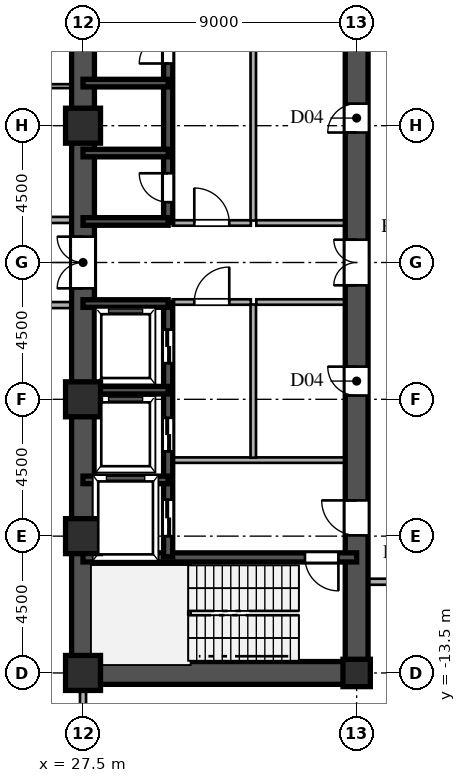
"""IFC4 building model, lengths in metres.
Left out: names, types, materials, properties, quantities, classifications, styles, units other than length and angle.
Written with IfcOpenShell. Run it as: python <this file> out.ifc"""

import sys

from ifc_helpers import new_model, si_unit, direction, frame, frame_2d, origin, origin_2d, place, context, subcontext, project, spatial, rectangle, hollow_rectangle, i_section, extrude, source, transform, mapped, element, fill, save


model = new_model("IFC4")
c1 = context("Model", 3, precision=1e-05, world=origin(), true_north=direction((0.0, 1.0)))
c2 = subcontext(c1, "Body", "Model", "MODEL_VIEW")
j1 = project(units=[si_unit("LENGTHUNIT", "METRE"), si_unit("PLANEANGLEUNIT", "RADIAN")], contexts=[c1])
p1 = place(None, origin())
s1 = spatial("IfcSite", under=j1, at=p1, CompositionType="ELEMENT")
p2 = place(p1, origin())
s2 = spatial("IfcBuilding", under=s1, at=p2, CompositionType="ELEMENT")
p3 = place(p2, frame((0.0, 0.0, -9.6)))
s3 = spatial("IfcBuildingStorey", under=s2, at=p3, CompositionType="ELEMENT", Elevation=-9.6)
m1 = source(origin(), c2, "Body", "SweptSolid", [
    extrude(hollow_rectangle(XDim=1.15, YDim=1.15, WallThickness=0.048, at=origin_2d()), origin(), (0.0, 0.0, 1.0), 4.8),
])
for number, where, z_axis, x_axis in (
    (1, (27.5, -13.5, 0.0), (0.0, 0.0, 1.0), (1.0, 0.0, 0.0)),
    (2, (27.5, -9.0, 0.0), (0.0, 0.0, 1.0), (1.0, 0.0, 0.0)),
    (3, (27.5, -4.5, 0.0), (0.0, 0.0, 1.0), (1.0, 0.0, 0.0)),
    (4, (27.5, 4.5, 0.0), (0.0, 0.0, 1.0), (1.0, 0.0, 0.0)),
):
    element("IfcColumn", number, at=place(p3, frame(where, z_axis=z_axis, x_axis=x_axis)), inside=s3, PredefinedType="COLUMN", context=c2, shape_type="MappedRepresentation", body=[
        mapped(m1, transform((0.0, 0.0, 0.0), scale=1.0)),
    ])
m2 = source(origin(), c2, "Body", "SweptSolid", [
    extrude(i_section(OverallWidth=0.9, OverallDepth=0.9, WebThickness=0.036, FlangeThickness=0.055, at=origin_2d()), origin(), (0.0, 0.0, 1.0), 4.8),
])
p4 = place(p3, frame((36.5, -13.5, 0.0), z_axis=(0.0, 0.0, 1.0), x_axis=(1.0, 0.0, 0.0)))
e5 = element("IfcColumn", 5, at=p4, inside=s3, PredefinedType="COLUMN", context=c2, shape_type="MappedRepresentation", body=[
    mapped(m2, transform((0.0, 0.0, 0.0), scale=1.0)),
])
for number, where, z_axis, x_axis in (
    (6, (27.5, -13.5, 0.0), (0.0, 0.0, 1.0), (0.0, 1.0, 0.0)),
    (7, (27.5, 1.3, 0.0), (0.0, 0.0, 1.0), (0.0, 1.0, 0.0)),
):
    element("IfcWall", number, at=place(p3, frame(where, z_axis=z_axis, x_axis=x_axis)), inside=s3, PredefinedType="SHEAR", context=c2, shape_type="SweptSolid", body=[
        extrude(rectangle(XDim=12.2, YDim=0.75, at=frame_2d((6.1, 0.0))), origin(), (0.0, 0.0, 1.0), 4.5),
    ])
p5 = place(p3, frame((27.5, -1.3, 0.0), z_axis=(0.0, 0.0, 1.0), x_axis=(0.0, 1.0, 0.0)))
e8 = element("IfcWall", 8, at=p5, inside=s3, PredefinedType="SHEAR", context=c2, shape_type="SweptSolid", body=[
    extrude(rectangle(XDim=2.6, YDim=0.75, at=frame_2d((1.3, 0.0))), origin(), (0.0, 0.0, 1.0), 4.5),
])
p6 = place(p5, frame((0.45, 0.0, 0.0)))
e9 = element("IfcOpeningElement", 9, at=p6, cuts=e8, PredefinedType="OPENING", context=c2, shape_type="SweptSolid", body=[
    extrude(rectangle(XDim=1.7, YDim=2.35, at=frame_2d((0.85, 1.175))), frame((0.0, 0.385, 0.0), z_axis=(0.0, -1.0, 0.0), x_axis=(1.0, 0.0, 0.0)), (0.0, 0.0, 1.0), 0.77),
])
p7 = place(p3, frame((27.5, -13.5, 0.0), z_axis=(0.0, 0.0, 1.0), x_axis=(1.0, 0.0, 0.0)))
e10 = element("IfcWall", 10, at=p7, inside=s3, PredefinedType="SHEAR", context=c2, shape_type="SweptSolid", body=[
    extrude(rectangle(XDim=9.0, YDim=0.75, at=frame_2d((4.5, 0.0))), origin(), (0.0, 0.0, 1.0), 4.5),
])
p8 = place(p3, frame((36.5, -13.65, 0.0), z_axis=(0.0, 0.0, 1.0), x_axis=(0.0, 1.0, 0.0)))
e11 = element("IfcWall", 11, at=p8, inside=s3, PredefinedType="SHEAR", context=c2, shape_type="SweptSolid", body=[
    extrude(rectangle(XDim=7.15, YDim=0.75, at=frame_2d((3.575, 0.0))), origin(), (0.0, 0.0, 1.0), 4.5),
])
p9 = place(p8, frame((4.675, 0.0, 0.0)))
e12 = element("IfcOpeningElement", 12, at=p9, cuts=e11, PredefinedType="OPENING", context=c2, shape_type="SweptSolid", body=[
    extrude(rectangle(XDim=1.15, YDim=2.2, at=frame_2d((0.575, 1.1))), frame((0.0, 0.385, 0.0), z_axis=(0.0, -1.0, 0.0), x_axis=(1.0, 0.0, 0.0)), (0.0, 0.0, 1.0), 0.77),
])
p10 = place(p3, frame((36.5, -1.3, 0.0), z_axis=(0.0, 0.0, 1.0), x_axis=(0.0, 1.0, 0.0)))
e13 = element("IfcWall", 13, at=p10, inside=s3, PredefinedType="SHEAR", context=c2, shape_type="SweptSolid", body=[
    extrude(rectangle(XDim=2.6, YDim=0.75, at=frame_2d((1.3, 0.0))), origin(), (0.0, 0.0, 1.0), 4.5),
])
p11 = place(p10, frame((0.55, 0.0, 0.0)))
e14 = element("IfcOpeningElement", 14, at=p11, cuts=e13, PredefinedType="OPENING", context=c2, shape_type="SweptSolid", body=[
    extrude(rectangle(XDim=1.5, YDim=2.3, at=frame_2d((0.75, 1.15))), frame((0.0, 0.385, 0.0), z_axis=(0.0, -1.0, 0.0), x_axis=(1.0, 0.0, 0.0)), (0.0, 0.0, 1.0), 0.77),
])
p12 = place(p3, frame((36.5, -6.5, 0.0), z_axis=(0.0, 0.0, 1.0), x_axis=(0.0, 1.0, 0.0)))
e15 = element("IfcWall", 15, at=p12, inside=s3, PredefinedType="SHEAR", context=c2, shape_type="SweptSolid", body=[
    extrude(rectangle(XDim=5.2, YDim=0.75, at=frame_2d((2.6, 0.0))), origin(), (0.0, 0.0, 1.0), 4.5),
])
p13 = place(p12, frame((2.125, 0.0, 0.0)))
e16 = element("IfcOpeningElement", 16, at=p13, cuts=e15, PredefinedType="OPENING", context=c2, shape_type="SweptSolid", body=[
    extrude(rectangle(XDim=0.95, YDim=2.15, at=frame_2d((0.475, 1.075))), frame((0.0, 0.385, 0.0), z_axis=(0.0, -1.0, 0.0), x_axis=(1.0, 0.0, 0.0)), (0.0, 0.0, 1.0), 0.77),
])
p14 = place(p3, frame((36.5, 1.3, 0.0), z_axis=(0.0, 0.0, 1.0), x_axis=(0.0, 1.0, 0.0)))
e17 = element("IfcWall", 17, at=p14, inside=s3, PredefinedType="SHEAR", context=c2, shape_type="SweptSolid", body=[
    extrude(rectangle(XDim=6.9, YDim=0.75, at=frame_2d((3.45, 0.0))), origin(), (0.0, 0.0, 1.0), 4.5),
])
p15 = place(p14, frame((2.975, 0.0, 0.0)))
e18 = element("IfcOpeningElement", 18, at=p15, cuts=e17, PredefinedType="OPENING", context=c2, shape_type="SweptSolid", body=[
    extrude(rectangle(XDim=0.95, YDim=2.15, at=frame_2d((0.475, 1.075))), frame((0.0, 0.385, 0.0), z_axis=(0.0, -1.0, 0.0), x_axis=(1.0, 0.0, 0.0)), (0.0, 0.0, 1.0), 0.77),
])
p16 = place(p3, frame((27.5, -9.7, 0.0), z_axis=(0.0, 0.0, 1.0), x_axis=(1.0, 0.0, 0.0)))
e19 = element("IfcWall", 19, at=p16, inside=s3, PredefinedType="SHEAR", context=c2, shape_type="SweptSolid", body=[
    extrude(rectangle(XDim=9.0, YDim=0.3, at=frame_2d((4.5, 0.0))), origin(), (0.0, 0.0, 1.0), 4.5),
])
p17 = place(p16, frame((7.3, 0.0, 0.0)))
e20 = element("IfcOpeningElement", 20, at=p17, cuts=e19, PredefinedType="OPENING", context=c2, shape_type="SweptSolid", body=[
    extrude(rectangle(XDim=1.1, YDim=2.2, at=frame_2d((0.55, 1.1))), frame((0.0, 0.16, 0.0), z_axis=(0.0, -1.0, 0.0), x_axis=(1.0, 0.0, 0.0)), (0.0, 0.0, 1.0), 0.32),
])
for number, where, z_axis, x_axis in (
    (21, (27.5, -7.15, 0.0), (0.0, 0.0, 1.0), (1.0, 0.0, 0.0)),
    (22, (27.5, -4.2, 0.0), (0.0, 0.0, 1.0), (1.0, 0.0, 0.0)),
    (23, (27.5, -1.35, 0.0), (0.0, 0.0, 1.0), (1.0, 0.0, 0.0)),
    (24, (27.5, 1.35, 0.0), (0.0, 0.0, 1.0), (1.0, 0.0, 0.0)),
    (25, (27.5, 3.6, 0.0), (0.0, 0.0, 1.0), (1.0, 0.0, 0.0)),
    (26, (27.5, 5.9, 0.0), (0.0, 0.0, 1.0), (1.0, 0.0, 0.0)),
):
    element("IfcWall", number, at=place(p3, frame(where, z_axis=z_axis, x_axis=x_axis)), inside=s3, PredefinedType="SHEAR", context=c2, shape_type="SweptSolid", body=[
        extrude(rectangle(XDim=2.8, YDim=0.25, at=frame_2d((1.4, 0.0))), origin(), (0.0, 0.0, 1.0), 4.5),
    ])
p18 = place(p3, frame((30.3, -9.68, 0.0), z_axis=(0.0, 0.0, 1.0), x_axis=(0.0, 1.0, 0.0)))
e27 = element("IfcWall", 27, at=p18, inside=s3, PredefinedType="SHEAR", context=c2, shape_type="SweptSolid", body=[
    extrude(rectangle(XDim=2.56, YDim=0.3, at=frame_2d((1.28, 0.0))), origin(), (0.0, 0.0, 1.0), 4.5),
])
p19 = place(p18, frame((0.68, 0.0, 0.0)))
e28 = element("IfcOpeningElement", 28, at=p19, cuts=e27, PredefinedType="OPENING", context=c2, shape_type="SweptSolid", body=[
    extrude(rectangle(XDim=1.2, YDim=2.25, at=frame_2d((0.6, 1.125))), frame((0.0, 0.16, 0.0), z_axis=(0.0, -1.0, 0.0), x_axis=(1.0, 0.0, 0.0)), (0.0, 0.0, 1.0), 0.32),
])
p20 = place(p3, frame((30.3, -7.12, 0.0), z_axis=(0.0, 0.0, 1.0), x_axis=(0.0, 1.0, 0.0)))
e29 = element("IfcWall", 29, at=p20, inside=s3, PredefinedType="SHEAR", context=c2, shape_type="SweptSolid", body=[
    extrude(rectangle(XDim=2.92, YDim=0.3, at=frame_2d((1.46, 0.0))), origin(), (0.0, 0.0, 1.0), 4.5),
])
p21 = place(p20, frame((0.91, 0.0, 0.0)))
e30 = element("IfcOpeningElement", 30, at=p21, cuts=e29, PredefinedType="OPENING", context=c2, shape_type="SweptSolid", body=[
    extrude(rectangle(XDim=1.1, YDim=2.2, at=frame_2d((0.55, 1.1))), frame((0.0, 0.16, 0.0), z_axis=(0.0, -1.0, 0.0), x_axis=(1.0, 0.0, 0.0)), (0.0, 0.0, 1.0), 0.32),
])
p22 = place(p3, frame((30.3, -4.2, 0.0), z_axis=(0.0, 0.0, 1.0), x_axis=(0.0, 1.0, 0.0)))
e31 = element("IfcWall", 31, at=p22, inside=s3, PredefinedType="SHEAR", context=c2, shape_type="SweptSolid", body=[
    extrude(rectangle(XDim=2.88, YDim=0.3, at=frame_2d((1.44, 0.0))), origin(), (0.0, 0.0, 1.0), 4.5),
])
p23 = place(p22, frame((0.89, 0.0, 0.0)))
e32 = element("IfcOpeningElement", 32, at=p23, cuts=e31, PredefinedType="OPENING", context=c2, shape_type="SweptSolid", body=[
    extrude(rectangle(XDim=1.1, YDim=2.2, at=frame_2d((0.55, 1.1))), frame((0.0, 0.16, 0.0), z_axis=(0.0, -1.0, 0.0), x_axis=(1.0, 0.0, 0.0)), (0.0, 0.0, 1.0), 0.32),
])
p24 = place(p3, frame((30.3, 1.32, 0.0), z_axis=(0.0, 0.0, 1.0), x_axis=(0.0, 1.0, 0.0)))
e33 = element("IfcWall", 33, at=p24, inside=s3, PredefinedType="SHEAR", context=c2, shape_type="SweptSolid", body=[
    extrude(rectangle(XDim=2.28, YDim=0.3, at=frame_2d((1.14, 0.0))), origin(), (0.0, 0.0, 1.0), 4.5),
])
p25 = place(p24, frame((0.665, 0.0, 0.0)))
e34 = element("IfcOpeningElement", 34, at=p25, cuts=e33, PredefinedType="OPENING", context=c2, shape_type="SweptSolid", body=[
    extrude(rectangle(XDim=0.95, YDim=2.15, at=frame_2d((0.475, 1.075))), frame((0.0, 0.16, 0.0), z_axis=(0.0, -1.0, 0.0), x_axis=(1.0, 0.0, 0.0)), (0.0, 0.0, 1.0), 0.32),
])
p26 = place(p3, frame((30.3, 3.6, 0.0), z_axis=(0.0, 0.0, 1.0), x_axis=(0.0, 1.0, 0.0)))
e35 = element("IfcWall", 35, at=p26, inside=s3, PredefinedType="SHEAR", context=c2, shape_type="SweptSolid", body=[
    extrude(rectangle(XDim=2.3, YDim=0.3, at=frame_2d((1.15, 0.0))), origin(), (0.0, 0.0, 1.0), 4.5),
])
p27 = place(p3, frame((30.3, 5.9, 0.0), z_axis=(0.0, 0.0, 1.0), x_axis=(0.0, 1.0, 0.0)))
e36 = element("IfcWall", 36, at=p27, inside=s3, PredefinedType="SHEAR", context=c2, shape_type="SweptSolid", body=[
    extrude(rectangle(XDim=2.25, YDim=0.3, at=frame_2d((1.125, 0.0))), origin(), (0.0, 0.0, 1.0), 4.5),
])
p28 = place(p27, frame((0.645, 0.0, 0.0)))
e37 = element("IfcOpeningElement", 37, at=p28, cuts=e36, PredefinedType="OPENING", context=c2, shape_type="SweptSolid", body=[
    extrude(rectangle(XDim=0.95, YDim=2.15, at=frame_2d((0.475, 1.075))), frame((0.0, 0.16, 0.0), z_axis=(0.0, -1.0, 0.0), x_axis=(1.0, 0.0, 0.0)), (0.0, 0.0, 1.0), 0.32),
])
p29 = place(p3, frame((30.45, -6.5, 0.0), z_axis=(0.0, 0.0, 1.0), x_axis=(1.0, 0.0, 0.0)))
e38 = element("IfcWall", 38, at=p29, inside=s3, PredefinedType="PARTITIONING", context=c2, shape_type="SweptSolid", body=[
    extrude(rectangle(XDim=5.7, YDim=0.18, at=frame_2d((2.85, 0.0))), origin(), (0.0, 0.0, 1.0), 4.5),
])
p30 = place(p3, frame((33.1, -6.42, 0.0), z_axis=(0.0, 0.0, 1.0), x_axis=(0.0, 1.0, 0.0)))
e39 = element("IfcWall", 39, at=p30, inside=s3, PredefinedType="PARTITIONING", context=c2, shape_type="SweptSolid", body=[
    extrude(rectangle(XDim=5.04, YDim=0.18, at=frame_2d((2.52, 0.0))), origin(), (0.0, 0.0, 1.0), 4.5),
])
p31 = place(p3, frame((33.1, 1.38, 0.0), z_axis=(0.0, 0.0, 1.0), x_axis=(0.0, 1.0, 0.0)))
e40 = element("IfcWall", 40, at=p31, inside=s3, PredefinedType="PARTITIONING", context=c2, shape_type="SweptSolid", body=[
    extrude(rectangle(XDim=6.74, YDim=0.18, at=frame_2d((3.37, 0.0))), origin(), (0.0, 0.0, 1.0), 4.5),
])
p32 = place(p3, frame((30.45, -1.3, 0.0), z_axis=(0.0, 0.0, 1.0), x_axis=(1.0, 0.0, 0.0)))
e41 = element("IfcWall", 41, at=p32, inside=s3, PredefinedType="PARTITIONING", context=c2, shape_type="SweptSolid", body=[
    extrude(rectangle(XDim=2.57, YDim=0.18, at=frame_2d((1.285, 0.0))), origin(), (0.0, 0.0, 1.0), 4.5),
])
p33 = place(p32, frame((0.71, 0.0, 0.0)))
e42 = element("IfcOpeningElement", 42, at=p33, cuts=e41, PredefinedType="OPENING", context=c2, shape_type="SweptSolid", body=[
    extrude(rectangle(XDim=1.15, YDim=2.2, at=frame_2d((0.575, 1.1))), frame((0.0, 0.1, 0.0), z_axis=(0.0, -1.0, 0.0), x_axis=(1.0, 0.0, 0.0)), (0.0, 0.0, 1.0), 0.2),
])
p34 = place(p3, frame((30.45, 1.3, 0.0), z_axis=(0.0, 0.0, 1.0), x_axis=(1.0, 0.0, 0.0)))
e43 = element("IfcWall", 43, at=p34, inside=s3, PredefinedType="PARTITIONING", context=c2, shape_type="SweptSolid", body=[
    extrude(rectangle(XDim=2.57, YDim=0.18, at=frame_2d((1.285, 0.0))), origin(), (0.0, 0.0, 1.0), 4.5),
])
p35 = place(p34, frame((0.71, 0.0, 0.0)))
e44 = element("IfcOpeningElement", 44, at=p35, cuts=e43, PredefinedType="OPENING", context=c2, shape_type="SweptSolid", body=[
    extrude(rectangle(XDim=1.15, YDim=2.2, at=frame_2d((0.575, 1.1))), frame((0.0, 0.1, 0.0), z_axis=(0.0, -1.0, 0.0), x_axis=(1.0, 0.0, 0.0)), (0.0, 0.0, 1.0), 0.2),
])
for number, where, z_axis, x_axis in (
    (45, (33.2, -1.3, 0.0), (0.0, 0.0, 1.0), (1.0, 0.0, 0.0)),
    (46, (33.2, 1.3, 0.0), (0.0, 0.0, 1.0), (1.0, 0.0, 0.0)),
):
    element("IfcWall", number, at=place(p3, frame(where, z_axis=z_axis, x_axis=x_axis)), inside=s3, PredefinedType="PARTITIONING", context=c2, shape_type="SweptSolid", body=[
        extrude(rectangle(XDim=2.95, YDim=0.18, at=frame_2d((1.475, 0.0))), origin(), (0.0, 0.0, 1.0), 4.5),
    ])
p36 = place(p3, frame((36.88, -10.5, 0.0), z_axis=(0.0, 0.0, 1.0), x_axis=(1.0, 0.0, 0.0)))
e47 = element("IfcWall", 47, at=p36, inside=s3, PredefinedType="PARTITIONING", context=c2, shape_type="SweptSolid", body=[
    extrude(rectangle(XDim=2.035, YDim=0.2, at=frame_2d((1.018, 0.0))), origin(), (0.0, 0.0, 1.0), 4.5),
])
p37 = place(p3, frame((-27.12, -1.4, 0.0), z_axis=(0.0, 0.0, 1.0), x_axis=(1.0, 0.0, 0.0)))
e48 = element("IfcWall", 48, at=p37, inside=s3, PredefinedType="PARTITIONING", context=c2, shape_type="SweptSolid", body=[
    extrude(rectangle(XDim=54.24, YDim=0.2, at=frame_2d((27.12, 0.0))), origin(), (0.0, 0.0, 1.0), 4.5),
])
p38 = place(p37, frame((15.545, 0.0, 0.0)))
e49 = element("IfcOpeningElement", 49, at=p38, cuts=e48, PredefinedType="OPENING", context=c2, shape_type="SweptSolid", body=[
    extrude(rectangle(XDim=1.15, YDim=2.2, at=frame_2d((0.575, 1.1))), frame((0.0, 0.11, 0.0), z_axis=(0.0, -1.0, 0.0), x_axis=(1.0, 0.0, 0.0)), (0.0, 0.0, 1.0), 0.22),
])
p39 = place(p37, frame((37.545, 0.0, 0.0)))
e50 = element("IfcOpeningElement", 50, at=p39, cuts=e48, PredefinedType="OPENING", context=c2, shape_type="SweptSolid", body=[
    extrude(rectangle(XDim=1.15, YDim=2.2, at=frame_2d((0.575, 1.1))), frame((0.0, 0.11, 0.0), z_axis=(0.0, -1.0, 0.0), x_axis=(1.0, 0.0, 0.0)), (0.0, 0.0, 1.0), 0.22),
])
p40 = place(p3, frame((-27.12, 1.4, 0.0), z_axis=(0.0, 0.0, 1.0), x_axis=(1.0, 0.0, 0.0)))
e51 = element("IfcWall", 51, at=p40, inside=s3, PredefinedType="PARTITIONING", context=c2, shape_type="SweptSolid", body=[
    extrude(rectangle(XDim=54.24, YDim=0.2, at=frame_2d((27.12, 0.0))), origin(), (0.0, 0.0, 1.0), 4.5),
])
p41 = place(p40, frame((19.545, 0.0, 0.0)))
e52 = element("IfcOpeningElement", 52, at=p41, cuts=e51, PredefinedType="OPENING", context=c2, shape_type="SweptSolid", body=[
    extrude(rectangle(XDim=1.15, YDim=2.2, at=frame_2d((0.575, 1.1))), frame((0.0, 0.11, 0.0), z_axis=(0.0, -1.0, 0.0), x_axis=(1.0, 0.0, 0.0)), (0.0, 0.0, 1.0), 0.22),
])
p42 = place(p40, frame((46.93, 0.0, 0.0)))
e53 = element("IfcOpeningElement", 53, at=p42, cuts=e51, PredefinedType="OPENING", context=c2, shape_type="SweptSolid", body=[
    extrude(rectangle(XDim=0.88, YDim=2.1, at=frame_2d((0.44, 1.05))), frame((0.0, 0.11, 0.0), z_axis=(0.0, -1.0, 0.0), x_axis=(1.0, 0.0, 0.0)), (0.0, 0.0, 1.0), 0.22),
])
p43 = place(p3, frame((18.085, 5.8, 0.0), z_axis=(0.0, 0.0, 1.0), x_axis=(1.0, 0.0, 0.0)))
e54 = element("IfcWall", 54, at=p43, inside=s3, PredefinedType="PARTITIONING", context=c2, shape_type="SweptSolid", body=[
    extrude(rectangle(XDim=9.035, YDim=0.13, at=frame_2d((4.518, 0.0))), origin(), (0.0, 0.0, 1.0), 4.5),
])
p44 = place(p3, frame((27.5, -21.812, 0.0), z_axis=(0.0, 0.0, 1.0), x_axis=(0.0, 1.0, 0.0)))
e55 = element("IfcWall", 55, at=p44, inside=s3, PredefinedType="PARTITIONING", context=c2, shape_type="SweptSolid", body=[
    extrude(rectangle(XDim=7.933, YDim=0.2, at=frame_2d((3.966, 0.0))), origin(), (0.0, 0.0, 1.0), 3.912),
])
m3 = source(origin(), c2, "Body", "SweptSolid", [
    extrude(rectangle(XDim=1.7, YDim=2.35, at=frame_2d((0.85, 1.175))), frame((0.0, 0.025, 0.0), z_axis=(0.0, -1.0, 0.0), x_axis=(1.0, 0.0, 0.0)), (0.0, 0.0, 1.0), 0.05),
])
p45 = place(p6, origin())
e56 = element("IfcDoor", 56, at=p45, inside=s3, OperationType="DOUBLE_SWING_LEFT", PredefinedType="DOOR", context=c2, shape_type="MappedRepresentation", body=[
    mapped(m3, transform((0.0, 0.0, 0.0), scale=1.0)),
])
fill(e9, e56)
m4 = source(origin(), c2, "Body", "SweptSolid", [
    extrude(rectangle(XDim=1.15, YDim=2.2, at=frame_2d((0.575, 1.1))), frame((0.0, 0.025, 0.0), z_axis=(0.0, -1.0, 0.0), x_axis=(1.0, 0.0, 0.0)), (0.0, 0.0, 1.0), 0.05),
])
p46 = place(p9, origin())
e57 = element("IfcDoor", 57, at=p46, inside=s3, OperationType="SINGLE_SWING_RIGHT", PredefinedType="DOOR", context=c2, shape_type="MappedRepresentation", body=[
    mapped(m4, transform((0.0, 0.0, 0.0), scale=1.0)),
])
fill(e12, e57)
m5 = source(origin(), c2, "Body", "SweptSolid", [
    extrude(rectangle(XDim=1.5, YDim=2.3, at=frame_2d((0.75, 1.15))), frame((0.0, 0.025, 0.0), z_axis=(0.0, -1.0, 0.0), x_axis=(1.0, 0.0, 0.0)), (0.0, 0.0, 1.0), 0.05),
])
p47 = place(p11, origin())
e58 = element("IfcDoor", 58, at=p47, inside=s3, OperationType="DOUBLE_SWING_LEFT", PredefinedType="DOOR", context=c2, shape_type="MappedRepresentation", body=[
    mapped(m5, transform((0.0, 0.0, 0.0), scale=1.0)),
])
fill(e14, e58)
m6 = source(origin(), c2, "Body", "SweptSolid", [
    extrude(rectangle(XDim=0.95, YDim=2.15, at=frame_2d((0.475, 1.075))), frame((0.0, 0.025, 0.0), z_axis=(0.0, -1.0, 0.0), x_axis=(1.0, 0.0, 0.0)), (0.0, 0.0, 1.0), 0.05),
])
p48 = place(p13, origin())
e59 = element("IfcDoor", 59, at=p48, inside=s3, OperationType="SINGLE_SWING_RIGHT", PredefinedType="DOOR", context=c2, shape_type="MappedRepresentation", body=[
    mapped(m6, transform((0.0, 0.0, 0.0), scale=1.0)),
])
fill(e16, e59)
p49 = place(p15, origin())
e60 = element("IfcDoor", 60, at=p49, inside=s3, OperationType="SINGLE_SWING_LEFT", PredefinedType="DOOR", context=c2, shape_type="MappedRepresentation", body=[
    mapped(m6, transform((0.0, 0.0, 0.0), scale=1.0)),
])
fill(e18, e60)
m7 = source(origin(), c2, "Body", "SweptSolid", [
    extrude(rectangle(XDim=1.1, YDim=2.2, at=frame_2d((0.55, 1.1))), frame((0.0, 0.025, 0.0), z_axis=(0.0, -1.0, 0.0), x_axis=(1.0, 0.0, 0.0)), (0.0, 0.0, 1.0), 0.05),
])
p50 = place(p17, frame((1.1, 0.0, 0.0), z_axis=(0.0, 0.0, 1.0), x_axis=(-1.0, 0.0, 0.0)))
e61 = element("IfcDoor", 61, at=p50, inside=s3, OperationType="SINGLE_SWING_RIGHT", PredefinedType="DOOR", context=c2, shape_type="MappedRepresentation", body=[
    mapped(m7, transform((0.0, 0.0, 0.0), scale=1.0)),
])
fill(e20, e61)
m8 = source(origin(), c2, "Body", "SweptSolid", [
    extrude(rectangle(XDim=1.2, YDim=2.25, at=frame_2d((0.6, 1.125))), frame((0.0, 0.025, 0.0), z_axis=(0.0, -1.0, 0.0), x_axis=(1.0, 0.0, 0.0)), (0.0, 0.0, 1.0), 0.05),
])
p51 = place(p19, origin())
e62 = element("IfcDoor", 62, at=p51, inside=s3, OperationType="DOUBLE_DOOR_SLIDING", PredefinedType="DOOR", context=c2, shape_type="MappedRepresentation", body=[
    mapped(m8, transform((0.0, 0.0, 0.0), scale=1.0)),
])
fill(e28, e62)
m9 = source(origin(), c2, "Body", "SweptSolid", [
    extrude(rectangle(XDim=1.1, YDim=2.2, at=frame_2d((0.55, 1.1))), frame((0.0, 0.025, 0.0), z_axis=(0.0, -1.0, 0.0), x_axis=(1.0, 0.0, 0.0)), (0.0, 0.0, 1.0), 0.05),
])
p52 = place(p21, origin())
e63 = element("IfcDoor", 63, at=p52, inside=s3, OperationType="DOUBLE_DOOR_SLIDING", PredefinedType="DOOR", context=c2, shape_type="MappedRepresentation", body=[
    mapped(m9, transform((0.0, 0.0, 0.0), scale=1.0)),
])
fill(e30, e63)
p53 = place(p23, origin())
e64 = element("IfcDoor", 64, at=p53, inside=s3, OperationType="DOUBLE_DOOR_SLIDING", PredefinedType="DOOR", context=c2, shape_type="MappedRepresentation", body=[
    mapped(m9, transform((0.0, 0.0, 0.0), scale=1.0)),
])
fill(e32, e64)
p54 = place(p25, origin())
e65 = element("IfcDoor", 65, at=p54, inside=s3, OperationType="SINGLE_SWING_RIGHT", PredefinedType="DOOR", context=c2, shape_type="MappedRepresentation", body=[
    mapped(m6, transform((0.0, 0.0, 0.0), scale=1.0)),
])
fill(e34, e65)
p55 = place(p28, origin())
e66 = element("IfcDoor", 66, at=p55, inside=s3, OperationType="SINGLE_SWING_LEFT", PredefinedType="DOOR", context=c2, shape_type="MappedRepresentation", body=[
    mapped(m6, transform((0.0, 0.0, 0.0), scale=1.0)),
])
fill(e37, e66)
p56 = place(p33, origin())
e67 = element("IfcDoor", 67, at=p56, inside=s3, OperationType="SINGLE_SWING_RIGHT", PredefinedType="DOOR", context=c2, shape_type="MappedRepresentation", body=[
    mapped(m4, transform((0.0, 0.0, 0.0), scale=1.0)),
])
fill(e42, e67)
p57 = place(p35, origin())
e68 = element("IfcDoor", 68, at=p57, inside=s3, OperationType="SINGLE_SWING_LEFT", PredefinedType="DOOR", context=c2, shape_type="MappedRepresentation", body=[
    mapped(m4, transform((0.0, 0.0, 0.0), scale=1.0)),
])
fill(e44, e68)
save(model, sys.argv[1])
